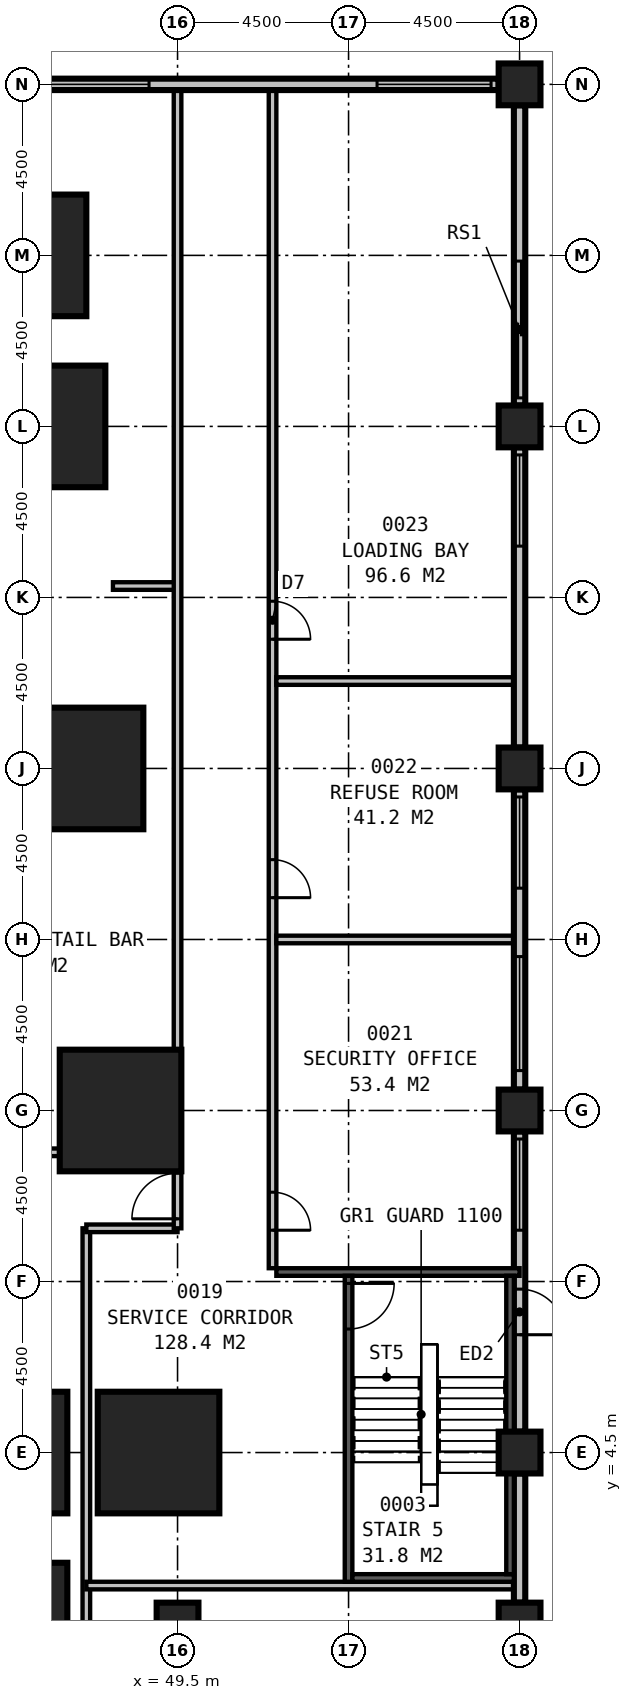
"""IFC4 building model, lengths in metres.
Left out: names, types, materials, properties, quantities, classifications, styles, units other than length and angle.
Written with IfcOpenShell. Run it as: python <this file> out.ifc"""

import sys

from ifc_helpers import new_model, si_unit, direction, frame, frame_2d, origin, origin_2d, place, context, subcontext, project, spatial, rectangle, extrude, element, fill, save


model = new_model("IFC4")
c1 = context("Model", 3, precision=1e-05, world=origin(), true_north=direction((0.0, 1.0)))
c2 = subcontext(c1, "Body", "Model", "MODEL_VIEW")
j1 = project(units=[si_unit("LENGTHUNIT", "METRE"), si_unit("PLANEANGLEUNIT", "RADIAN")], contexts=[c1])
p1 = place(None, origin())
s1 = spatial("IfcSite", under=j1, at=p1, CompositionType="ELEMENT")
p2 = place(p1, origin())
s2 = spatial("IfcBuilding", under=s1, at=p2, CompositionType="ELEMENT")
p3 = place(p2, origin())
s3 = spatial("IfcBuildingStorey", under=s2, at=p3, CompositionType="ELEMENT", Elevation=0.0)
for number, where, z_axis, x_axis in (
    (1, (45.0, 0.0, 0.0), (0.0, 0.0, 1.0), (1.0, 0.0, 0.0)),
    (2, (45.0, 4.5, 0.0), (0.0, 0.0, 1.0), (1.0, 0.0, 0.0)),
    (3, (49.0, 4.5, 0.0), (0.0, 0.0, 1.0), (1.0, 0.0, 0.0)),
    (4, (48.0, 13.5, 0.0), (0.0, 0.0, 1.0), (1.0, 0.0, 0.0)),
    (5, (47.0, 22.5, 0.0), (0.0, 0.0, 1.0), (1.0, 0.0, 0.0)),
    (6, (46.0, 31.5, 0.0), (0.0, 0.0, 1.0), (1.0, 0.0, 0.0)),
    (7, (45.5, 36.0, 0.0), (0.0, 0.0, 1.0), (1.0, 0.0, 0.0)),
):
    element("IfcColumn", number, at=place(p3, frame(where, z_axis=z_axis, x_axis=x_axis)), inside=s3, PredefinedType="COLUMN", context=c2, shape_type="SweptSolid", body=[
        extrude(rectangle(XDim=3.2, YDim=3.2, at=origin_2d()), origin(), (0.0, 0.0, 1.0), 6.0),
    ])
for number, where, z_axis, x_axis in (
    (8, (58.5, 4.5, 0.0), (0.0, 0.0, 1.0), (1.0, 0.0, 0.0)),
    (9, (58.5, 13.5, 0.0), (0.0, 0.0, 1.0), (1.0, 0.0, 0.0)),
    (10, (58.5, 22.5, 0.0), (0.0, 0.0, 1.0), (1.0, 0.0, 0.0)),
    (11, (58.5, 31.5, 0.0), (0.0, 0.0, 1.0), (1.0, 0.0, 0.0)),
    (12, (58.5, 40.5, 0.0), (0.0, 0.0, 1.0), (1.0, 0.0, 0.0)),
    (13, (58.5, 0.0, 0.0), (0.0, 0.0, 1.0), (1.0, 0.0, 0.0)),
    (14, (49.5, 0.0, 0.0), (0.0, 0.0, 1.0), (1.0, 0.0, 0.0)),
):
    element("IfcColumn", number, at=place(p3, frame(where, z_axis=z_axis, x_axis=x_axis)), inside=s3, PredefinedType="COLUMN", context=c2, shape_type="SweptSolid", body=[
        extrude(rectangle(XDim=1.1, YDim=1.1, at=origin_2d()), origin(), (0.0, 0.0, 1.0), 6.0),
    ])
p4 = place(p3, frame((58.5, 0.55, 0.0), z_axis=(0.0, 0.0, 1.0), x_axis=(0.0, 1.0, 0.0)))
e15 = element("IfcWall", 15, at=p4, inside=s3, PredefinedType="STANDARD", context=c2, shape_type="SweptSolid", body=[
    extrude(rectangle(XDim=3.4, YDim=0.3, at=frame_2d((1.7, 0.0))), origin(), (0.0, 0.0, 1.0), 4.8),
])
p5 = place(p3, frame((58.5, 5.05, 0.0), z_axis=(0.0, 0.0, 1.0), x_axis=(0.0, 1.0, 0.0)))
e16 = element("IfcWall", 16, at=p5, inside=s3, PredefinedType="STANDARD", context=c2, shape_type="SweptSolid", body=[
    extrude(rectangle(XDim=7.9, YDim=0.3, at=frame_2d((3.95, 0.0))), origin(), (0.0, 0.0, 1.0), 4.8),
])
p6 = place(p5, frame((3.75, 0.0, 0.0), z_axis=(0.0, 0.0, 1.0), x_axis=(-1.0, 0.0, 0.0)))
e17 = element("IfcOpeningElement", 17, at=p6, cuts=e16, PredefinedType="OPENING", context=c2, shape_type="SweptSolid", body=[
    extrude(rectangle(XDim=1.2, YDim=2.4, at=frame_2d((0.6, 1.2))), frame((0.0, 0.16, 0.0), z_axis=(0.0, -1.0, 0.0), x_axis=(1.0, 0.0, 0.0)), (0.0, 0.0, 1.0), 0.32),
])
p7 = place(p5, frame((5.3, 0.0, 0.5)))
e18 = element("IfcOpeningElement", 18, at=p7, cuts=e16, PredefinedType="OPENING", context=c2, shape_type="SweptSolid", body=[
    extrude(rectangle(XDim=2.4, YDim=3.0, at=frame_2d((1.2, 1.5))), frame((0.0, 0.16, 0.0), z_axis=(0.0, -1.0, 0.0), x_axis=(1.0, 0.0, 0.0)), (0.0, 0.0, 1.0), 0.32),
])
p8 = place(p3, frame((58.5, 14.05, 0.0), z_axis=(0.0, 0.0, 1.0), x_axis=(0.0, 1.0, 0.0)))
e19 = element("IfcWall", 19, at=p8, inside=s3, PredefinedType="STANDARD", context=c2, shape_type="SweptSolid", body=[
    extrude(rectangle(XDim=7.9, YDim=0.3, at=frame_2d((3.95, 0.0))), origin(), (0.0, 0.0, 1.0), 4.1),
])
p9 = place(p8, frame((0.5, 0.0, 0.5)))
e20 = element("IfcOpeningElement", 20, at=p9, cuts=e19, PredefinedType="OPENING", context=c2, shape_type="SweptSolid", body=[
    extrude(rectangle(XDim=3.0, YDim=3.0, at=frame_2d((1.5, 1.5))), frame((0.0, 0.16, 0.0), z_axis=(0.0, -1.0, 0.0), x_axis=(1.0, 0.0, 0.0)), (0.0, 0.0, 1.0), 0.32),
])
p10 = place(p8, frame((5.3, 0.0, 0.5)))
e21 = element("IfcOpeningElement", 21, at=p10, cuts=e19, PredefinedType="OPENING", context=c2, shape_type="SweptSolid", body=[
    extrude(rectangle(XDim=2.4, YDim=3.0, at=frame_2d((1.2, 1.5))), frame((0.0, 0.16, 0.0), z_axis=(0.0, -1.0, 0.0), x_axis=(1.0, 0.0, 0.0)), (0.0, 0.0, 1.0), 0.32),
])
p11 = place(p3, frame((58.5, 23.05, 0.0), z_axis=(0.0, 0.0, 1.0), x_axis=(0.0, 1.0, 0.0)))
e22 = element("IfcWall", 22, at=p11, inside=s3, PredefinedType="STANDARD", context=c2, shape_type="SweptSolid", body=[
    extrude(rectangle(XDim=7.9, YDim=0.3, at=frame_2d((3.95, 0.0))), origin(), (0.0, 0.0, 1.0), 4.1),
])
p12 = place(p11, frame((5.3, 0.0, 0.5)))
e23 = element("IfcOpeningElement", 23, at=p12, cuts=e22, PredefinedType="OPENING", context=c2, shape_type="SweptSolid", body=[
    extrude(rectangle(XDim=2.4, YDim=3.0, at=frame_2d((1.2, 1.5))), frame((0.0, 0.16, 0.0), z_axis=(0.0, -1.0, 0.0), x_axis=(1.0, 0.0, 0.0)), (0.0, 0.0, 1.0), 0.32),
])
p13 = place(p3, frame((58.5, 32.05, 0.0), z_axis=(0.0, 0.0, 1.0), x_axis=(0.0, 1.0, 0.0)))
e24 = element("IfcWall", 24, at=p13, inside=s3, PredefinedType="STANDARD", context=c2, shape_type="SweptSolid", body=[
    extrude(rectangle(XDim=7.9, YDim=0.3, at=frame_2d((3.95, 0.0))), origin(), (0.0, 0.0, 1.0), 4.1),
])
p14 = place(p13, frame((0.2, 0.0, 0.0)))
e25 = element("IfcOpeningElement", 25, at=p14, cuts=e24, PredefinedType="OPENING", context=c2, shape_type="SweptSolid", body=[
    extrude(rectangle(XDim=3.6, YDim=4.0, at=frame_2d((1.8, 2.0))), frame((0.0, 0.16, 0.0), z_axis=(0.0, -1.0, 0.0), x_axis=(1.0, 0.0, 0.0)), (0.0, 0.0, 1.0), 0.32),
])
p15 = place(p3, frame((57.95, 40.5, 0.0), z_axis=(0.0, 0.0, 1.0), x_axis=(-1.0, 0.0, 0.0)))
e26 = element("IfcWall", 26, at=p15, inside=s3, PredefinedType="STANDARD", context=c2, shape_type="SweptSolid", body=[
    extrude(rectangle(XDim=12.4, YDim=0.3, at=frame_2d((6.2, 0.0))), origin(), (0.0, 0.0, 1.0), 4.0),
])
p16 = place(p15, frame((0.2, 0.0, 0.5)))
e27 = element("IfcOpeningElement", 27, at=p16, cuts=e26, PredefinedType="OPENING", context=c2, shape_type="SweptSolid", body=[
    extrude(rectangle(XDim=3.0, YDim=3.0, at=frame_2d((1.5, 1.5))), frame((0.0, 0.16, 0.0), z_axis=(0.0, -1.0, 0.0), x_axis=(1.0, 0.0, 0.0)), (0.0, 0.0, 1.0), 0.32),
])
p17 = place(p15, frame((9.2, 0.0, 0.5)))
e28 = element("IfcOpeningElement", 28, at=p17, cuts=e26, PredefinedType="OPENING", context=c2, shape_type="SweptSolid", body=[
    extrude(rectangle(XDim=3.0, YDim=3.0, at=frame_2d((1.5, 1.5))), frame((0.0, 0.16, 0.0), z_axis=(0.0, -1.0, 0.0), x_axis=(1.0, 0.0, 0.0)), (0.0, 0.0, 1.0), 0.32),
])
p18 = place(p3, frame((54.0, 1.1, 0.0), z_axis=(0.0, 0.0, 1.0), x_axis=(0.0, 1.0, 0.0)))
e29 = element("IfcWall", 29, at=p18, inside=s3, PredefinedType="SOLIDWALL", context=c2, shape_type="SweptSolid", body=[
    extrude(rectangle(XDim=8.05, YDim=0.2, at=frame_2d((4.025, 0.0))), origin(), (0.0, 0.0, 1.0), 5.7),
])
p19 = place(p18, frame((7.85, 0.0, 0.0), z_axis=(0.0, 0.0, 1.0), x_axis=(-1.0, 0.0, 0.0)))
e30 = element("IfcOpeningElement", 30, at=p19, cuts=e29, PredefinedType="OPENING", context=c2, shape_type="SweptSolid", body=[
    extrude(rectangle(XDim=1.2, YDim=2.1, at=frame_2d((0.6, 1.05))), frame((0.0, 0.11, 0.0), z_axis=(0.0, -1.0, 0.0), x_axis=(1.0, 0.0, 0.0)), (0.0, 0.0, 1.0), 0.22),
])
p20 = place(p3, frame((52.1, 9.25, 0.0), z_axis=(0.0, 0.0, 1.0), x_axis=(1.0, 0.0, 0.0)))
e31 = element("IfcWall", 31, at=p20, inside=s3, PredefinedType="SOLIDWALL", context=c2, shape_type="SweptSolid", body=[
    extrude(rectangle(XDim=6.4, YDim=0.2, at=frame_2d((3.2, 0.0))), origin(), (0.0, 0.0, 1.0), 5.7),
])
p21 = place(p3, frame((54.1, 1.2, 0.0), z_axis=(0.0, 0.0, 1.0), x_axis=(1.0, 0.0, 0.0)))
e32 = element("IfcWall", 32, at=p21, inside=s3, PredefinedType="SOLIDWALL", context=c2, shape_type="SweptSolid", body=[
    extrude(rectangle(XDim=4.25, YDim=0.2, at=frame_2d((2.125, 0.0))), origin(), (0.0, 0.0, 1.0), 5.7),
])
p22 = place(p3, frame((58.25, 1.3, 0.0), z_axis=(0.0, 0.0, 1.0), x_axis=(0.0, 1.0, 0.0)))
e33 = element("IfcWall", 33, at=p22, inside=s3, PredefinedType="SOLIDWALL", context=c2, shape_type="SweptSolid", body=[
    extrude(rectangle(XDim=2.65, YDim=0.2, at=frame_2d((1.325, 0.0))), origin(), (0.0, 0.0, 1.0), 5.7),
])
p23 = place(p3, frame((58.25, 5.05, 0.0), z_axis=(0.0, 0.0, 1.0), x_axis=(0.0, 1.0, 0.0)))
e34 = element("IfcWall", 34, at=p23, inside=s3, PredefinedType="SOLIDWALL", context=c2, shape_type="SweptSolid", body=[
    extrude(rectangle(XDim=4.1, YDim=0.2, at=frame_2d((2.05, 0.0))), origin(), (0.0, 0.0, 1.0), 5.7),
])
p24 = place(p23, frame((2.55, 0.0, 0.0)))
e35 = element("IfcOpeningElement", 35, at=p24, cuts=e34, PredefinedType="OPENING", context=c2, shape_type="SweptSolid", body=[
    extrude(rectangle(XDim=1.2, YDim=2.4, at=frame_2d((0.6, 1.2))), frame((0.0, 0.11, 0.0), z_axis=(0.0, -1.0, 0.0), x_axis=(1.0, 0.0, 0.0)), (0.0, 0.0, 1.0), 0.22),
])
p25 = place(p3, frame((47.1, -0.65, 0.0), z_axis=(0.0, 0.0, 1.0), x_axis=(0.0, 1.0, 0.0)))
e36 = element("IfcWall", 36, at=p25, inside=s3, PredefinedType="PARTITIONING", context=c2, shape_type="SweptSolid", body=[
    extrude(rectangle(XDim=11.05, YDim=0.2, at=frame_2d((5.525, 0.0))), origin(), (0.0, 0.0, 1.0), 5.7),
])
p26 = place(p3, frame((47.1, 10.4, 0.0), z_axis=(0.0, 0.0, 1.0), x_axis=(1.0, 0.0, 0.0)))
e37 = element("IfcWall", 37, at=p26, inside=s3, PredefinedType="PARTITIONING", context=c2, shape_type="SweptSolid", body=[
    extrude(rectangle(XDim=2.4, YDim=0.2, at=frame_2d((1.2, 0.0))), origin(), (0.0, 0.0, 1.0), 5.7),
])
p27 = place(p3, frame((49.5, 10.4, 0.0), z_axis=(0.0, 0.0, 1.0), x_axis=(0.0, 1.0, 0.0)))
e38 = element("IfcWall", 38, at=p27, inside=s3, PredefinedType="PARTITIONING", context=c2, shape_type="SweptSolid", body=[
    extrude(rectangle(XDim=30.1, YDim=0.2, at=frame_2d((15.05, 0.0))), origin(), (0.0, 0.0, 1.0), 5.7),
])
p28 = place(p27, frame((0.25, 0.0, 0.0)))
e39 = element("IfcOpeningElement", 39, at=p28, cuts=e38, PredefinedType="OPENING", context=c2, shape_type="SweptSolid", body=[
    extrude(rectangle(XDim=1.2, YDim=2.1, at=frame_2d((0.6, 1.05))), frame((0.0, 0.11, 0.0), z_axis=(0.0, -1.0, 0.0), x_axis=(1.0, 0.0, 0.0)), (0.0, 0.0, 1.0), 0.22),
])
p29 = place(p3, frame((47.8, 27.3, 0.0), z_axis=(0.0, 0.0, 1.0), x_axis=(1.0, 0.0, 0.0)))
e40 = element("IfcWall", 40, at=p29, inside=s3, PredefinedType="PARTITIONING", context=c2, shape_type="SweptSolid", body=[
    extrude(rectangle(XDim=1.7, YDim=0.2, at=frame_2d((0.85, 0.0))), origin(), (0.0, 0.0, 1.0), 5.7),
])
p30 = place(p3, frame((40.5, 12.4, 0.0), z_axis=(0.0, 0.0, 1.0), x_axis=(1.0, 0.0, 0.0)))
e41 = element("IfcWall", 41, at=p30, inside=s3, PredefinedType="PARTITIONING", context=c2, shape_type="SweptSolid", body=[
    extrude(rectangle(XDim=6.2, YDim=0.2, at=frame_2d((3.1, 0.0))), origin(), (0.0, 0.0, 1.0), 5.7),
])
p31 = place(p3, frame((52.0, 9.35, 0.0), z_axis=(0.0, 0.0, 1.0), x_axis=(0.0, 1.0, 0.0)))
e42 = element("IfcWall", 42, at=p31, inside=s3, PredefinedType="PARTITIONING", context=c2, shape_type="SweptSolid", body=[
    extrude(rectangle(XDim=31.15, YDim=0.2, at=frame_2d((15.575, 0.0))), origin(), (0.0, 0.0, 1.0), 5.7),
])
p32 = place(p31, frame((2.0, 0.0, 0.0), z_axis=(0.0, 0.0, 1.0), x_axis=(-1.0, 0.0, 0.0)))
e43 = element("IfcOpeningElement", 43, at=p32, cuts=e42, PredefinedType="OPENING", context=c2, shape_type="SweptSolid", body=[
    extrude(rectangle(XDim=1.0, YDim=2.1, at=frame_2d((0.5, 1.05))), frame((0.0, 0.11, 0.0), z_axis=(0.0, -1.0, 0.0), x_axis=(1.0, 0.0, 0.0)), (0.0, 0.0, 1.0), 0.22),
])
p33 = place(p31, frame((10.75, 0.0, 0.0), z_axis=(0.0, 0.0, 1.0), x_axis=(-1.0, 0.0, 0.0)))
e44 = element("IfcOpeningElement", 44, at=p33, cuts=e42, PredefinedType="OPENING", context=c2, shape_type="SweptSolid", body=[
    extrude(rectangle(XDim=1.0, YDim=2.1, at=frame_2d((0.5, 1.05))), frame((0.0, 0.11, 0.0), z_axis=(0.0, -1.0, 0.0), x_axis=(1.0, 0.0, 0.0)), (0.0, 0.0, 1.0), 0.22),
])
p34 = place(p31, frame((17.55, 0.0, 0.0), z_axis=(0.0, 0.0, 1.0), x_axis=(-1.0, 0.0, 0.0)))
e45 = element("IfcOpeningElement", 45, at=p34, cuts=e42, PredefinedType="OPENING", context=c2, shape_type="SweptSolid", body=[
    extrude(rectangle(XDim=1.0, YDim=2.1, at=frame_2d((0.5, 1.05))), frame((0.0, 0.11, 0.0), z_axis=(0.0, -1.0, 0.0), x_axis=(1.0, 0.0, 0.0)), (0.0, 0.0, 1.0), 0.22),
])
p35 = place(p3, frame((47.1, 1.0, 0.0), z_axis=(0.0, 0.0, 1.0), x_axis=(1.0, 0.0, 0.0)))
e46 = element("IfcWall", 46, at=p35, inside=s3, PredefinedType="PARTITIONING", context=c2, shape_type="SweptSolid", body=[
    extrude(rectangle(XDim=11.4, YDim=0.2, at=frame_2d((5.7, 0.0))), origin(), (0.0, 0.0, 1.0), 4.8),
])
for number, where, z_axis, x_axis in (
    (47, (52.1, 18.0, 0.0), (0.0, 0.0, 1.0), (1.0, 0.0, 0.0)),
    (48, (52.1, 24.8, 0.0), (0.0, 0.0, 1.0), (1.0, 0.0, 0.0)),
):
    element("IfcWall", number, at=place(p3, frame(where, z_axis=z_axis, x_axis=x_axis)), inside=s3, PredefinedType="PARTITIONING", context=c2, shape_type="SweptSolid", body=[
        extrude(rectangle(XDim=6.4, YDim=0.2, at=frame_2d((3.2, 0.0))), origin(), (0.0, 0.0, 1.0), 5.7),
    ])
p36 = place(p6, origin())
e49 = element("IfcDoor", 49, at=p36, inside=s3, OperationType="SINGLE_SWING_RIGHT", PredefinedType="DOOR", context=c2, shape_type="SweptSolid", body=[
    extrude(rectangle(XDim=1.2, YDim=2.4, at=frame_2d((0.6, 1.2))), frame((0.0, 0.025, 0.0), z_axis=(0.0, -1.0, 0.0), x_axis=(1.0, 0.0, 0.0)), (0.0, 0.0, 1.0), 0.05),
])
fill(e17, e49)
p37 = place(p14, origin())
e50 = element("IfcDoor", 50, at=p37, inside=s3, OperationType="ROLLINGUP", PredefinedType="DOOR", context=c2, shape_type="SweptSolid", body=[
    extrude(rectangle(XDim=3.6, YDim=4.0, at=frame_2d((1.8, 2.0))), frame((0.0, 0.025, 0.0), z_axis=(0.0, -1.0, 0.0), x_axis=(1.0, 0.0, 0.0)), (0.0, 0.0, 1.0), 0.05),
])
fill(e25, e50)
p38 = place(p7, origin())
e51 = element("IfcWindow", 51, at=p38, inside=s3, PartitioningType="SINGLE_PANEL", PredefinedType="WINDOW", context=c2, shape_type="SweptSolid", body=[
    extrude(rectangle(XDim=2.4, YDim=3.0, at=frame_2d((1.2, 1.5))), frame((0.0, 0.03, 0.0), z_axis=(0.0, -1.0, 0.0), x_axis=(1.0, 0.0, 0.0)), (0.0, 0.0, 1.0), 0.06),
])
fill(e18, e51)
p39 = place(p9, origin())
e52 = element("IfcWindow", 52, at=p39, inside=s3, PartitioningType="SINGLE_PANEL", PredefinedType="WINDOW", context=c2, shape_type="SweptSolid", body=[
    extrude(rectangle(XDim=3.0, YDim=3.0, at=frame_2d((1.5, 1.5))), frame((0.0, 0.03, 0.0), z_axis=(0.0, -1.0, 0.0), x_axis=(1.0, 0.0, 0.0)), (0.0, 0.0, 1.0), 0.06),
])
fill(e20, e52)
p40 = place(p10, origin())
e53 = element("IfcWindow", 53, at=p40, inside=s3, PartitioningType="SINGLE_PANEL", PredefinedType="WINDOW", context=c2, shape_type="SweptSolid", body=[
    extrude(rectangle(XDim=2.4, YDim=3.0, at=frame_2d((1.2, 1.5))), frame((0.0, 0.03, 0.0), z_axis=(0.0, -1.0, 0.0), x_axis=(1.0, 0.0, 0.0)), (0.0, 0.0, 1.0), 0.06),
])
fill(e21, e53)
p41 = place(p12, origin())
e54 = element("IfcWindow", 54, at=p41, inside=s3, PartitioningType="SINGLE_PANEL", PredefinedType="WINDOW", context=c2, shape_type="SweptSolid", body=[
    extrude(rectangle(XDim=2.4, YDim=3.0, at=frame_2d((1.2, 1.5))), frame((0.0, 0.03, 0.0), z_axis=(0.0, -1.0, 0.0), x_axis=(1.0, 0.0, 0.0)), (0.0, 0.0, 1.0), 0.06),
])
fill(e23, e54)
p42 = place(p16, origin())
e55 = element("IfcWindow", 55, at=p42, inside=s3, PartitioningType="SINGLE_PANEL", PredefinedType="WINDOW", context=c2, shape_type="SweptSolid", body=[
    extrude(rectangle(XDim=3.0, YDim=3.0, at=frame_2d((1.5, 1.5))), frame((0.0, 0.03, 0.0), z_axis=(0.0, -1.0, 0.0), x_axis=(1.0, 0.0, 0.0)), (0.0, 0.0, 1.0), 0.06),
])
fill(e27, e55)
p43 = place(p17, origin())
e56 = element("IfcWindow", 56, at=p43, inside=s3, PartitioningType="SINGLE_PANEL", PredefinedType="WINDOW", context=c2, shape_type="SweptSolid", body=[
    extrude(rectangle(XDim=3.0, YDim=3.0, at=frame_2d((1.5, 1.5))), frame((0.0, 0.03, 0.0), z_axis=(0.0, -1.0, 0.0), x_axis=(1.0, 0.0, 0.0)), (0.0, 0.0, 1.0), 0.06),
])
fill(e28, e56)
p44 = place(p19, origin())
e57 = element("IfcDoor", 57, at=p44, inside=s3, OperationType="SINGLE_SWING_LEFT", PredefinedType="DOOR", context=c2, shape_type="SweptSolid", body=[
    extrude(rectangle(XDim=1.2, YDim=2.1, at=frame_2d((0.6, 1.05))), frame((0.0, 0.025, 0.0), z_axis=(0.0, -1.0, 0.0), x_axis=(1.0, 0.0, 0.0)), (0.0, 0.0, 1.0), 0.05),
])
fill(e30, e57)
p45 = place(p28, origin())
e58 = element("IfcDoor", 58, at=p45, inside=s3, OperationType="SINGLE_SWING_LEFT", PredefinedType="DOOR", context=c2, shape_type="SweptSolid", body=[
    extrude(rectangle(XDim=1.2, YDim=2.1, at=frame_2d((0.6, 1.05))), frame((0.0, 0.025, 0.0), z_axis=(0.0, -1.0, 0.0), x_axis=(1.0, 0.0, 0.0)), (0.0, 0.0, 1.0), 0.05),
])
fill(e39, e58)
p46 = place(p32, origin())
e59 = element("IfcDoor", 59, at=p46, inside=s3, OperationType="SINGLE_SWING_RIGHT", PredefinedType="DOOR", context=c2, shape_type="SweptSolid", body=[
    extrude(rectangle(XDim=1.0, YDim=2.1, at=frame_2d((0.5, 1.05))), frame((0.0, 0.025, 0.0), z_axis=(0.0, -1.0, 0.0), x_axis=(1.0, 0.0, 0.0)), (0.0, 0.0, 1.0), 0.05),
])
fill(e43, e59)
p47 = place(p33, origin())
e60 = element("IfcDoor", 60, at=p47, inside=s3, OperationType="SINGLE_SWING_RIGHT", PredefinedType="DOOR", context=c2, shape_type="SweptSolid", body=[
    extrude(rectangle(XDim=1.0, YDim=2.1, at=frame_2d((0.5, 1.05))), frame((0.0, 0.025, 0.0), z_axis=(0.0, -1.0, 0.0), x_axis=(1.0, 0.0, 0.0)), (0.0, 0.0, 1.0), 0.05),
])
fill(e44, e60)
p48 = place(p34, origin())
e61 = element("IfcDoor", 61, at=p48, inside=s3, OperationType="SINGLE_SWING_RIGHT", PredefinedType="DOOR", context=c2, shape_type="SweptSolid", body=[
    extrude(rectangle(XDim=1.0, YDim=2.1, at=frame_2d((0.5, 1.05))), frame((0.0, 0.025, 0.0), z_axis=(0.0, -1.0, 0.0), x_axis=(1.0, 0.0, 0.0)), (0.0, 0.0, 1.0), 0.05),
])
fill(e45, e61)
save(model, sys.argv[1])
